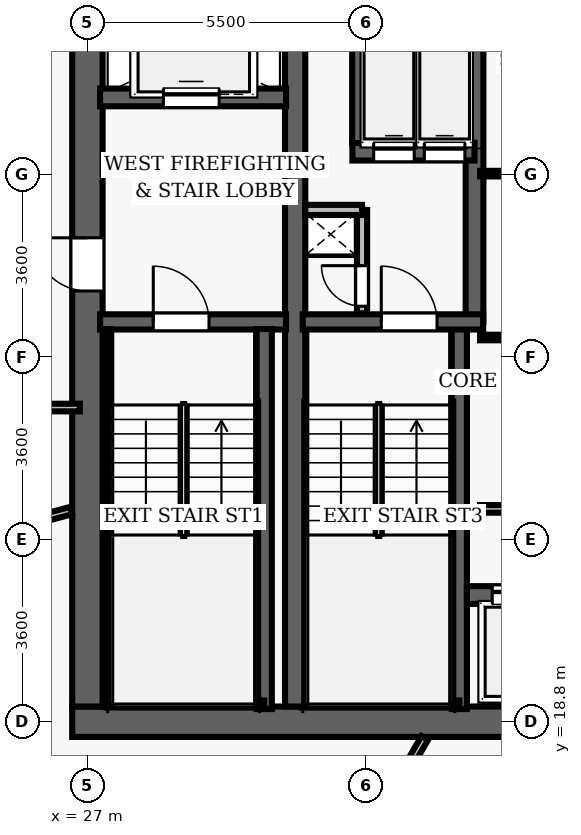
"""IFC4 building model, lengths in metres.
Left out: names, types, materials, properties, quantities, classifications, styles, units other than length and angle.
Written with IfcOpenShell. Run it as: python <this file> out.ifc"""

import sys

from ifc_helpers import new_model, si_unit, direction, frame, frame_2d, origin, place, context, subcontext, project, spatial, rectangle, extrude, element, fill, save


model = new_model("IFC4")
c1 = context("Model", 3, precision=1e-05, world=origin(), true_north=direction((0.0, 1.0)))
c2 = subcontext(c1, "Body", "Model", "MODEL_VIEW")
j1 = project(units=[si_unit("LENGTHUNIT", "METRE"), si_unit("PLANEANGLEUNIT", "RADIAN")], contexts=[c1])
p1 = place(None, origin())
s1 = spatial("IfcSite", under=j1, at=p1, CompositionType="ELEMENT")
p2 = place(p1, origin())
s2 = spatial("IfcBuilding", under=s1, at=p2, CompositionType="ELEMENT")
p3 = place(p2, frame((0.0, 0.0, 130.8)))
s3 = spatial("IfcBuildingStorey", under=s2, at=p3, CompositionType="ELEMENT", Elevation=130.8)
p4 = place(p3, frame((26.7, 18.8, 0.0), z_axis=(0.0, 0.0, 1.0), x_axis=(1.0, 0.0, 0.0)))
e1 = element("IfcWall", 1, at=p4, inside=s3, PredefinedType="SHEAR", context=c2, shape_type="SweptSolid", body=[
    extrude(rectangle(XDim=22.6, YDim=0.6, at=frame_2d((11.3, 0.0))), origin(), (0.0, 0.0, 1.0), 3.5),
])
p5 = place(p4, frame((14.52, 0.0, 0.0)))
e2 = element("IfcOpeningElement", 2, at=p5, cuts=e1, PredefinedType="OPENING", context=c2, shape_type="SweptSolid", body=[
    extrude(rectangle(XDim=1.05, YDim=2.15, at=frame_2d((0.525, 1.075))), frame((0.0, 0.31, 0.0), z_axis=(0.0, -1.0, 0.0), x_axis=(1.0, 0.0, 0.0)), (0.0, 0.0, 1.0), 0.62),
])
p6 = place(p3, frame((27.0, 19.1, 0.0), z_axis=(0.0, 0.0, 1.0), x_axis=(0.0, 1.0, 0.0)))
e3 = element("IfcWall", 3, at=p6, inside=s3, PredefinedType="SHEAR", context=c2, shape_type="SweptSolid", body=[
    extrude(rectangle(XDim=13.8, YDim=0.6, at=frame_2d((6.9, 0.0))), origin(), (0.0, 0.0, 1.0), 3.5),
])
p7 = place(p6, frame((8.2, 0.0, 0.0)))
e4 = element("IfcOpeningElement", 4, at=p7, cuts=e3, PredefinedType="OPENING", context=c2, shape_type="SweptSolid", body=[
    extrude(rectangle(XDim=1.05, YDim=2.15, at=frame_2d((0.525, 1.075))), frame((0.0, 0.31, 0.0), z_axis=(0.0, -1.0, 0.0), x_axis=(1.0, 0.0, 0.0)), (0.0, 0.0, 1.0), 0.62),
])
p8 = place(p3, frame((31.1, 19.1, 0.0), z_axis=(0.0, 0.0, 1.0), x_axis=(0.0, 1.0, 0.0)))
e5 = element("IfcWall", 5, at=p8, inside=s3, PredefinedType="SHEAR", context=c2, shape_type="SweptSolid", body=[
    extrude(rectangle(XDim=13.8, YDim=0.4, at=frame_2d((6.9, 0.0))), origin(), (0.0, 0.0, 1.0), 3.5),
])
p9 = place(p3, frame((27.25, 26.69, 0.0), z_axis=(0.0, 0.0, 1.0), x_axis=(1.0, 0.0, 0.0)))
e6 = element("IfcWall", 6, at=p9, inside=s3, PredefinedType="SHEAR", context=c2, shape_type="SweptSolid", body=[
    extrude(rectangle(XDim=3.67, YDim=0.3, at=frame_2d((1.835, 0.0))), origin(), (0.0, 0.0, 1.0), 3.5),
])
p10 = place(p9, frame((1.05, 0.0, 0.0)))
e7 = element("IfcOpeningElement", 7, at=p10, cuts=e6, PredefinedType="OPENING", context=c2, shape_type="SweptSolid", body=[
    extrude(rectangle(XDim=1.1, YDim=2.15, at=frame_2d((0.55, 1.075))), frame((0.0, 0.16, 0.0), z_axis=(0.0, -1.0, 0.0), x_axis=(1.0, 0.0, 0.0)), (0.0, 0.0, 1.0), 0.32),
])
p11 = place(p3, frame((30.49, 19.05, 0.0), z_axis=(0.0, 0.0, 1.0), x_axis=(0.0, 1.0, 0.0)))
e8 = element("IfcWall", 8, at=p11, inside=s3, PredefinedType="SHEAR", context=c2, shape_type="SweptSolid", body=[
    extrude(rectangle(XDim=7.5, YDim=0.3, at=frame_2d((3.75, 0.0))), origin(), (0.0, 0.0, 1.0), 3.5),
])
p12 = place(p3, frame((27.395, 19.1, 0.0), z_axis=(0.0, 0.0, 1.0), x_axis=(0.0, 1.0, 0.0)))
e9 = element("IfcWall", 9, at=p12, inside=s3, PredefinedType="SHEAR", context=c2, shape_type="SweptSolid", body=[
    extrude(rectangle(XDim=7.45, YDim=0.12, at=frame_2d((3.725, 0.0))), origin(), (0.0, 0.0, 1.0), 3.5),
])
p13 = place(p3, frame((27.395, 19.16, 0.0), z_axis=(0.0, 0.0, 1.0), x_axis=(1.0, 0.0, 0.0)))
e10 = element("IfcWall", 10, at=p13, inside=s3, PredefinedType="SHEAR", context=c2, shape_type="SweptSolid", body=[
    extrude(rectangle(XDim=3.095, YDim=0.12, at=frame_2d((1.547, 0.0))), origin(), (0.0, 0.0, 1.0), 3.5),
])
p14 = place(p3, frame((27.25, 31.12, 0.0), z_axis=(0.0, 0.0, 1.0), x_axis=(1.0, 0.0, 0.0)))
e11 = element("IfcWall", 11, at=p14, inside=s3, PredefinedType="SHEAR", context=c2, shape_type="SweptSolid", body=[
    extrude(rectangle(XDim=3.67, YDim=0.35, at=frame_2d((1.835, 0.0))), origin(), (0.0, 0.0, 1.0), 2.675),
])
p15 = place(p14, frame((1.25, 0.0, 0.0)))
e12 = element("IfcOpeningElement", 12, at=p15, cuts=e11, PredefinedType="OPENING", context=c2, shape_type="SweptSolid", body=[
    extrude(rectangle(XDim=1.1, YDim=2.15, at=frame_2d((0.55, 1.075))), frame((0.0, 0.185, 0.0), z_axis=(0.0, -1.0, 0.0), x_axis=(1.0, 0.0, 0.0)), (0.0, 0.0, 1.0), 0.37),
])
p16 = place(p3, frame((34.34, 19.05, 0.0), z_axis=(0.0, 0.0, 1.0), x_axis=(0.0, 1.0, 0.0)))
e13 = element("IfcWall", 13, at=p16, inside=s3, PredefinedType="SHEAR", context=c2, shape_type="SweptSolid", body=[
    extrude(rectangle(XDim=7.5, YDim=0.3, at=frame_2d((3.75, 0.0))), origin(), (0.0, 0.0, 1.0), 3.5),
])
p17 = place(p3, frame((34.64, 26.69, 0.0), z_axis=(0.0, 0.0, 1.0), x_axis=(0.0, 1.0, 0.0)))
e14 = element("IfcWall", 14, at=p17, inside=s3, PredefinedType="SHEAR", context=c2, shape_type="SweptSolid", body=[
    extrude(rectangle(XDim=6.26, YDim=0.35, at=frame_2d((3.13, 0.0))), origin(), (0.0, 0.0, 1.0), 3.5),
])
p18 = place(p3, frame((31.25, 26.69, 0.0), z_axis=(0.0, 0.0, 1.0), x_axis=(1.0, 0.0, 0.0)))
e15 = element("IfcWall", 15, at=p18, inside=s3, PredefinedType="SHEAR", context=c2, shape_type="SweptSolid", body=[
    extrude(rectangle(XDim=3.56, YDim=0.3, at=frame_2d((1.78, 0.0))), origin(), (0.0, 0.0, 1.0), 3.5),
])
p19 = place(p18, frame((1.55, 0.0, 0.0)))
e16 = element("IfcOpeningElement", 16, at=p19, cuts=e15, PredefinedType="OPENING", context=c2, shape_type="SweptSolid", body=[
    extrude(rectangle(XDim=1.1, YDim=2.15, at=frame_2d((0.55, 1.075))), frame((0.0, 0.16, 0.0), z_axis=(0.0, -1.0, 0.0), x_axis=(1.0, 0.0, 0.0)), (0.0, 0.0, 1.0), 0.32),
])
p20 = place(p3, frame((31.3, 19.16, 0.0), z_axis=(0.0, 0.0, 1.0), x_axis=(1.0, 0.0, 0.0)))
e17 = element("IfcWall", 17, at=p20, inside=s3, PredefinedType="SHEAR", context=c2, shape_type="SweptSolid", body=[
    extrude(rectangle(XDim=3.04, YDim=0.12, at=frame_2d((1.52, 0.0))), origin(), (0.0, 0.0, 1.0), 3.5),
])
p21 = place(p3, frame((32.23, 30.05, 0.0), z_axis=(0.0, 0.0, 1.0), x_axis=(1.0, 0.0, 0.0)))
e18 = element("IfcWall", 18, at=p21, inside=s3, PredefinedType="SHEAR", context=c2, shape_type="SweptSolid", body=[
    extrude(rectangle(XDim=2.41, YDim=0.35, at=frame_2d((1.205, 0.0))), origin(), (0.0, 0.0, 1.0), 2.675),
])
p22 = place(p21, frame((0.42, 0.0, 0.0)))
e19 = element("IfcOpeningElement", 19, at=p22, cuts=e18, PredefinedType="OPENING", context=c2, shape_type="SweptSolid", body=[
    extrude(rectangle(XDim=0.8, YDim=2.15, at=frame_2d((0.4, 1.075))), frame((0.0, 0.185, 0.0), z_axis=(0.0, -1.0, 0.0), x_axis=(1.0, 0.0, 0.0)), (0.0, 0.0, 1.0), 0.37),
])
p23 = place(p21, frame((1.42, 0.0, 0.0)))
e20 = element("IfcOpeningElement", 20, at=p23, cuts=e18, PredefinedType="OPENING", context=c2, shape_type="SweptSolid", body=[
    extrude(rectangle(XDim=0.8, YDim=2.15, at=frame_2d((0.4, 1.075))), frame((0.0, 0.185, 0.0), z_axis=(0.0, -1.0, 0.0), x_axis=(1.0, 0.0, 0.0)), (0.0, 0.0, 1.0), 0.37),
])
p24 = place(p3, frame((32.4, 30.22, 0.0), z_axis=(0.0, 0.0, 1.0), x_axis=(0.0, 1.0, 0.0)))
e21 = element("IfcWall", 21, at=p24, inside=s3, PredefinedType="SHEAR", context=c2, shape_type="SweptSolid", body=[
    extrude(rectangle(XDim=2.73, YDim=0.35, at=frame_2d((1.365, 0.0))), origin(), (0.0, 0.0, 1.0), 2.675),
])
p25 = place(p3, frame((32.42, 26.86, 0.0), z_axis=(0.0, 0.0, 1.0), x_axis=(0.0, 1.0, 0.0)))
e22 = element("IfcWall", 22, at=p25, inside=s3, PredefinedType="PARTITIONING", context=c2, shape_type="SweptSolid", body=[
    extrude(rectangle(XDim=2.04, YDim=0.2, at=frame_2d((1.02, 0.0))), origin(), (0.0, 0.0, 1.0), 2.675),
])
p26 = place(p25, frame((0.14, 0.0, 0.0)))
e23 = element("IfcOpeningElement", 23, at=p26, cuts=e22, PredefinedType="OPENING", context=c2, shape_type="SweptSolid", body=[
    extrude(rectangle(XDim=0.8, YDim=2.05, at=frame_2d((0.4, 1.025))), frame((0.0, 0.11, 0.0), z_axis=(0.0, -1.0, 0.0), x_axis=(1.0, 0.0, 0.0)), (0.0, 0.0, 1.0), 0.22),
])
p27 = place(p3, frame((31.3, 28.9, 0.0), z_axis=(0.0, 0.0, 1.0), x_axis=(1.0, 0.0, 0.0)))
e24 = element("IfcWall", 24, at=p27, inside=s3, PredefinedType="PARTITIONING", context=c2, shape_type="SweptSolid", body=[
    extrude(rectangle(XDim=1.12, YDim=0.2, at=frame_2d((0.56, 0.0))), origin(), (0.0, 0.0, 1.0), 2.675),
])
p28 = place(p3, frame((34.49, 21.3, 0.0), z_axis=(0.0, 0.0, 1.0), x_axis=(1.0, 0.0, 0.0)))
e25 = element("IfcWall", 25, at=p28, inside=s3, PredefinedType="SHEAR", context=c2, shape_type="SweptSolid", body=[
    extrude(rectangle(XDim=6.68, YDim=0.35, at=frame_2d((3.34, 0.0))), origin(), (0.0, 0.0, 1.0), 2.675),
])
p29 = place(p28, frame((0.5, 0.0, 0.0)))
e26 = element("IfcOpeningElement", 26, at=p29, cuts=e25, PredefinedType="OPENING", context=c2, shape_type="SweptSolid", body=[
    extrude(rectangle(XDim=0.9, YDim=2.15, at=frame_2d((0.45, 1.075))), frame((0.0, 0.185, 0.0), z_axis=(0.0, -1.0, 0.0), x_axis=(1.0, 0.0, 0.0)), (0.0, 0.0, 1.0), 0.37),
])
p30 = place(p28, frame((2.58, 0.0, 0.0)))
e27 = element("IfcOpeningElement", 27, at=p30, cuts=e25, PredefinedType="OPENING", context=c2, shape_type="SweptSolid", body=[
    extrude(rectangle(XDim=0.9, YDim=2.15, at=frame_2d((0.45, 1.075))), frame((0.0, 0.185, 0.0), z_axis=(0.0, -1.0, 0.0), x_axis=(1.0, 0.0, 0.0)), (0.0, 0.0, 1.0), 0.37),
])
p31 = place(p28, frame((4.66, 0.0, 0.0)))
e28 = element("IfcOpeningElement", 28, at=p31, cuts=e25, PredefinedType="OPENING", context=c2, shape_type="SweptSolid", body=[
    extrude(rectangle(XDim=0.9, YDim=2.15, at=frame_2d((0.45, 1.075))), frame((0.0, 0.185, 0.0), z_axis=(0.0, -1.0, 0.0), x_axis=(1.0, 0.0, 0.0)), (0.0, 0.0, 1.0), 0.37),
])
p32 = place(p3, frame((34.75, 23.0, 0.0), z_axis=(0.0, 0.0, 1.0), x_axis=(1.0, 0.0, 0.0)))
e29 = element("IfcWall", 29, at=p32, inside=s3, PredefinedType="PARTITIONING", context=c2, shape_type="SweptSolid", body=[
    extrude(rectangle(XDim=6.25, YDim=0.15, at=frame_2d((3.125, 0.0))), origin(), (0.0, 0.0, 1.0), 2.675),
])
for number, where, z_axis, x_axis in (
    (30, (34.75, 26.382, 0.0), (0.0, 0.0, 1.0), (1.0, 0.0, 0.0)),
    (31, (34.75, 29.616, 0.0), (0.0, 0.0, 1.0), (1.0, 0.0, 0.0)),
):
    element("IfcWall", number, at=place(p3, frame(where, z_axis=z_axis, x_axis=x_axis)), inside=s3, PredefinedType="PARTITIONING", context=c2, shape_type="SweptSolid", body=[
        extrude(rectangle(XDim=6.25, YDim=0.11, at=frame_2d((3.125, 0.0))), origin(), (0.0, 0.0, 1.0), 2.675),
    ])
p33 = place(p3, frame((14.5, 25.0, 0.0), z_axis=(0.0, 0.0, 1.0), x_axis=(1.0, 0.0, 0.0)))
e32 = element("IfcWall", 32, at=p33, inside=s3, PredefinedType="PARTITIONING", context=c2, shape_type="SweptSolid", body=[
    extrude(rectangle(XDim=12.35, YDim=0.15, at=frame_2d((6.175, 0.0))), origin(), (0.0, 0.0, 1.0), 2.675),
])
p34 = place(p3, frame((26.68, 22.967, 0.0), z_axis=(0.0, 0.0, 1.0), x_axis=(-0.965924955624, -0.258822294448, 0.0)))
e33 = element("IfcWall", 33, at=p34, inside=s3, PredefinedType="PARTITIONING", context=c2, shape_type="SweptSolid", body=[
    extrude(rectangle(XDim=12.787, YDim=0.15, at=frame_2d((6.394, 0.0))), origin(), (0.0, 0.0, 1.0), 2.675),
])
p35 = place(p3, frame((33.658, 18.48, 0.0), z_axis=(0.0, 0.0, 1.0), x_axis=(-0.499997182991, -0.866027030179, 0.0)))
e34 = element("IfcWall", 34, at=p35, inside=s3, PredefinedType="PARTITIONING", context=c2, shape_type="SweptSolid", body=[
    extrude(rectangle(XDim=14.231, YDim=0.15, at=frame_2d((7.115, 0.0))), origin(), (0.0, 0.0, 1.0), 2.675),
])
p36 = place(p10, origin())
e35 = element("IfcDoor", 35, at=p36, inside=s3, OperationType="SINGLE_SWING_LEFT", PredefinedType="DOOR", context=c2, shape_type="SweptSolid", body=[
    extrude(rectangle(XDim=1.1, YDim=2.15, at=frame_2d((0.55, 1.075))), frame((0.0, 0.025, 0.0), z_axis=(0.0, -1.0, 0.0), x_axis=(1.0, 0.0, 0.0)), (0.0, 0.0, 1.0), 0.05),
])
fill(e7, e35)
p37 = place(p7, origin())
e36 = element("IfcDoor", 36, at=p37, inside=s3, OperationType="SINGLE_SWING_RIGHT", PredefinedType="DOOR", context=c2, shape_type="SweptSolid", body=[
    extrude(rectangle(XDim=1.05, YDim=2.15, at=frame_2d((0.525, 1.075))), frame((0.0, 0.025, 0.0), z_axis=(0.0, -1.0, 0.0), x_axis=(1.0, 0.0, 0.0)), (0.0, 0.0, 1.0), 0.05),
])
fill(e4, e36)
p38 = place(p19, origin())
e37 = element("IfcDoor", 37, at=p38, inside=s3, OperationType="SINGLE_SWING_LEFT", PredefinedType="DOOR", context=c2, shape_type="SweptSolid", body=[
    extrude(rectangle(XDim=1.1, YDim=2.15, at=frame_2d((0.55, 1.075))), frame((0.0, 0.025, 0.0), z_axis=(0.0, -1.0, 0.0), x_axis=(1.0, 0.0, 0.0)), (0.0, 0.0, 1.0), 0.05),
])
fill(e16, e37)
p39 = place(p26, origin())
e38 = element("IfcDoor", 38, at=p39, inside=s3, OperationType="SINGLE_SWING_RIGHT", PredefinedType="DOOR", context=c2, shape_type="SweptSolid", body=[
    extrude(rectangle(XDim=0.8, YDim=2.05, at=frame_2d((0.4, 1.025))), frame((0.0, 0.025, 0.0), z_axis=(0.0, -1.0, 0.0), x_axis=(1.0, 0.0, 0.0)), (0.0, 0.0, 1.0), 0.05),
])
fill(e23, e38)
p40 = place(p29, origin())
e39 = element("IfcDoor", 39, at=p40, inside=s3, OperationType="SLIDING_TO_LEFT", PredefinedType="DOOR", context=c2, shape_type="SweptSolid", body=[
    extrude(rectangle(XDim=0.9, YDim=2.15, at=frame_2d((0.45, 1.075))), frame((0.0, 0.025, 0.0), z_axis=(0.0, -1.0, 0.0), x_axis=(1.0, 0.0, 0.0)), (0.0, 0.0, 1.0), 0.05),
])
fill(e26, e39)
p41 = place(p15, origin())
e40 = element("IfcDoor", 40, at=p41, inside=s3, OperationType="SLIDING_TO_LEFT", PredefinedType="DOOR", context=c2, shape_type="SweptSolid", body=[
    extrude(rectangle(XDim=1.1, YDim=2.15, at=frame_2d((0.55, 1.075))), frame((0.0, 0.025, 0.0), z_axis=(0.0, -1.0, 0.0), x_axis=(1.0, 0.0, 0.0)), (0.0, 0.0, 1.0), 0.05),
])
fill(e12, e40)
p42 = place(p22, origin())
e41 = element("IfcDoor", 41, at=p42, inside=s3, OperationType="SLIDING_TO_LEFT", PredefinedType="DOOR", context=c2, shape_type="SweptSolid", body=[
    extrude(rectangle(XDim=0.8, YDim=2.15, at=frame_2d((0.4, 1.075))), frame((0.0, 0.025, 0.0), z_axis=(0.0, -1.0, 0.0), x_axis=(1.0, 0.0, 0.0)), (0.0, 0.0, 1.0), 0.05),
])
fill(e19, e41)
p43 = place(p23, origin())
e42 = element("IfcDoor", 42, at=p43, inside=s3, OperationType="SLIDING_TO_LEFT", PredefinedType="DOOR", context=c2, shape_type="SweptSolid", body=[
    extrude(rectangle(XDim=0.8, YDim=2.15, at=frame_2d((0.4, 1.075))), frame((0.0, 0.025, 0.0), z_axis=(0.0, -1.0, 0.0), x_axis=(1.0, 0.0, 0.0)), (0.0, 0.0, 1.0), 0.05),
])
fill(e20, e42)
save(model, sys.argv[1])
